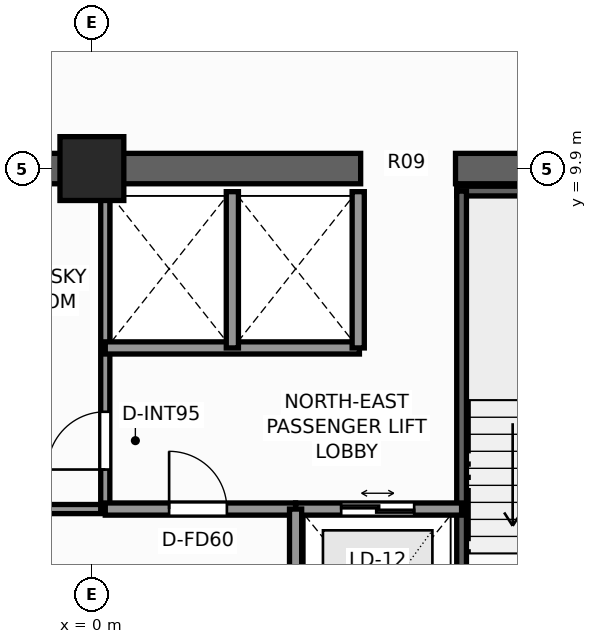
"""IFC4 building model, lengths in metres.
Left out: names, types, materials, properties, quantities, classifications, styles, units other than length and angle.
Written with IfcOpenShell. Run it as: python <this file> out.ifc"""

import sys

from ifc_helpers import new_model, si_unit, direction, frame, frame_2d, origin, origin_2d, place, context, subcontext, project, spatial, rectangle, extrude, element, fill, save


model = new_model("IFC4")
c1 = context("Model", 3, precision=1e-05, world=origin(), true_north=direction((0.0, 1.0)))
c2 = subcontext(c1, "Body", "Model", "MODEL_VIEW")
j1 = project(units=[si_unit("LENGTHUNIT", "METRE"), si_unit("PLANEANGLEUNIT", "RADIAN")], contexts=[c1])
p1 = place(None, origin())
s1 = spatial("IfcSite", under=j1, at=p1, CompositionType="ELEMENT")
p2 = place(p1, origin())
s2 = spatial("IfcBuilding", under=s1, at=p2, CompositionType="ELEMENT")
p3 = place(p2, frame((0.0, 0.0, 206.4)))
s3 = spatial("IfcBuildingStorey", under=s2, at=p3, CompositionType="ELEMENT", Elevation=206.4)
p4 = place(p3, frame((-10.15, 9.9, 0.0), z_axis=(0.0, 0.0, 1.0), x_axis=(1.0, 0.0, 0.0)))
e1 = element("IfcWall", 1, at=p4, inside=s3, PredefinedType="SHEAR", context=c2, shape_type="SweptSolid", body=[
    extrude(rectangle(XDim=14.57, YDim=0.5, at=frame_2d((7.285, 0.0))), origin(), (0.0, 0.0, 1.0), 3.3),
])
p5 = place(p3, frame((5.98, 9.9, 0.0), z_axis=(0.0, 0.0, 1.0), x_axis=(1.0, 0.0, 0.0)))
e2 = element("IfcWall", 2, at=p5, inside=s3, PredefinedType="SHEAR", context=c2, shape_type="SweptSolid", body=[
    extrude(rectangle(XDim=4.17, YDim=0.5, at=frame_2d((2.085, 0.0))), origin(), (0.0, 0.0, 1.0), 3.3),
])
p6 = place(p3, frame((0.0, 9.9, 0.0), z_axis=(0.0, 0.0, 1.0), x_axis=(1.0, 0.0, 0.0)))
e3 = element("IfcColumn", 3, at=p6, inside=s3, PredefinedType="COLUMN", context=c2, shape_type="SweptSolid", body=[
    extrude(rectangle(XDim=1.05, YDim=1.05, at=origin_2d()), origin(), (0.0, 0.0, 1.0), 3.3),
])
p7 = place(p3, frame((6.0, 9.53, 0.0), z_axis=(0.0, 0.0, 1.0), x_axis=(1.0, 0.0, 0.0)))
e4 = element("IfcWall", 4, at=p7, inside=s3, PredefinedType="SHEAR", context=c2, shape_type="SweptSolid", body=[
    extrude(rectangle(XDim=3.52, YDim=0.16, at=frame_2d((1.76, 0.0))), origin(), (0.0, 0.0, 1.0), 3.3),
])
p8 = place(p3, frame((6.08, 1.97, 0.0), z_axis=(0.0, 0.0, 1.0), x_axis=(0.0, 1.0, 0.0)))
e5 = element("IfcWall", 5, at=p8, inside=s3, PredefinedType="SHEAR", context=c2, shape_type="SweptSolid", body=[
    extrude(rectangle(XDim=7.56, YDim=0.16, at=frame_2d((3.78, 0.0))), origin(), (0.0, 0.0, 1.0), 3.3),
])
p9 = place(p3, frame((3.35, 4.3, 0.0), z_axis=(0.0, 0.0, 1.0), x_axis=(1.0, 0.0, 0.0)))
e6 = element("IfcWall", 6, at=p9, inside=s3, PredefinedType="SOLIDWALL", context=c2, shape_type="SweptSolid", body=[
    extrude(rectangle(XDim=2.73, YDim=0.2, at=frame_2d((1.365, 0.0))), origin(), (0.0, 0.0, 1.0), 3.08),
])
p10 = place(p9, frame((0.75, 0.0, 0.0)))
e7 = element("IfcOpeningElement", 7, at=p10, cuts=e6, PredefinedType="OPENING", context=c2, shape_type="SweptSolid", body=[
    extrude(rectangle(XDim=1.2, YDim=2.25, at=frame_2d((0.6, 1.125))), frame((0.0, 0.11, 0.0), z_axis=(0.0, -1.0, 0.0), x_axis=(1.0, 0.0, 0.0)), (0.0, 0.0, 1.0), 0.22),
])
p11 = place(p3, frame((-6.08, 4.3, 0.0), z_axis=(0.0, 0.0, 1.0), x_axis=(1.0, 0.0, 0.0)))
e8 = element("IfcWall", 8, at=p11, inside=s3, PredefinedType="PARTITIONING", context=c2, shape_type="SweptSolid", body=[
    extrude(rectangle(XDim=6.3, YDim=0.15, at=frame_2d((3.15, 0.0))), origin(), (0.0, 0.0, 1.0), 3.08),
])
p12 = place(p11, frame((1.05, 0.0, 0.0)))
e9 = element("IfcOpeningElement", 9, at=p12, cuts=e8, PredefinedType="OPENING", context=c2, shape_type="SweptSolid", body=[
    extrude(rectangle(XDim=0.85, YDim=2.03, at=frame_2d((0.425, 1.015))), frame((0.0, 0.085, 0.0), z_axis=(0.0, -1.0, 0.0), x_axis=(1.0, 0.0, 0.0)), (0.0, 0.0, 1.0), 0.17),
])
p13 = place(p3, frame((0.22, 4.3, 0.0), z_axis=(0.0, 0.0, 1.0), x_axis=(0.0, 1.0, 0.0)))
e10 = element("IfcWall", 10, at=p13, inside=s3, PredefinedType="PARTITIONING", context=c2, shape_type="SweptSolid", body=[
    extrude(rectangle(XDim=5.22, YDim=0.15, at=frame_2d((2.61, 0.0))), origin(), (0.0, 0.0, 1.0), 3.08),
])
p14 = place(p13, frame((0.65, 0.0, 0.0)))
e11 = element("IfcOpeningElement", 11, at=p14, cuts=e10, PredefinedType="OPENING", context=c2, shape_type="SweptSolid", body=[
    extrude(rectangle(XDim=0.95, YDim=2.06, at=frame_2d((0.475, 1.03))), frame((0.0, 0.085, 0.0), z_axis=(0.0, -1.0, 0.0), x_axis=(1.0, 0.0, 0.0)), (0.0, 0.0, 1.0), 0.17),
])
p15 = place(p3, frame((0.22, 6.95, 0.0), z_axis=(0.0, 0.0, 1.0), x_axis=(1.0, 0.0, 0.0)))
e12 = element("IfcWall", 12, at=p15, inside=s3, PredefinedType="SOLIDWALL", context=c2, shape_type="SweptSolid", body=[
    extrude(rectangle(XDim=4.18, YDim=0.2, at=frame_2d((2.09, 0.0))), origin(), (0.0, 0.0, 1.0), 3.08),
])
for number, where, z_axis, x_axis in (
    (13, (4.38, 6.95, 0.0), (0.0, 0.0, 1.0), (0.0, 1.0, 0.0)),
    (14, (2.31, 6.95, 0.0), (0.0, 0.0, 1.0), (0.0, 1.0, 0.0)),
):
    element("IfcWall", number, at=place(p3, frame(where, z_axis=z_axis, x_axis=x_axis)), inside=s3, PredefinedType="SOLIDWALL", context=c2, shape_type="SweptSolid", body=[
        extrude(rectangle(XDim=2.57, YDim=0.2, at=frame_2d((1.285, 0.0))), origin(), (0.0, 0.0, 1.0), 3.08),
    ])
p16 = place(p3, frame((0.22, 4.3, 0.0), z_axis=(0.0, 0.0, 1.0), x_axis=(1.0, 0.0, 0.0)))
e15 = element("IfcWall", 15, at=p16, inside=s3, PredefinedType="SOLIDWALL", context=c2, shape_type="SweptSolid", body=[
    extrude(rectangle(XDim=3.13, YDim=0.2, at=frame_2d((1.565, 0.0))), origin(), (0.0, 0.0, 1.0), 3.08),
])
p17 = place(p16, frame((1.05, 0.0, 0.0)))
e16 = element("IfcOpeningElement", 16, at=p17, cuts=e15, PredefinedType="OPENING", context=c2, shape_type="SweptSolid", body=[
    extrude(rectangle(XDim=0.95, YDim=2.06, at=frame_2d((0.475, 1.03))), frame((0.0, 0.11, 0.0), z_axis=(0.0, -1.0, 0.0), x_axis=(1.0, 0.0, 0.0)), (0.0, 0.0, 1.0), 0.22),
])
p18 = place(p3, frame((3.35, 1.1, 0.0), z_axis=(0.0, 0.0, 1.0), x_axis=(0.0, 1.0, 0.0)))
e17 = element("IfcWall", 17, at=p18, inside=s3, PredefinedType="SOLIDWALL", context=c2, shape_type="SweptSolid", body=[
    extrude(rectangle(XDim=3.2, YDim=0.2, at=frame_2d((1.6, 0.0))), origin(), (0.0, 0.0, 1.0), 3.08),
])
p19 = place(p10, origin())
e18 = element("IfcDoor", 18, at=p19, inside=s3, OperationType="DOUBLE_DOOR_SLIDING", PredefinedType="DOOR", context=c2, shape_type="SweptSolid", body=[
    extrude(rectangle(XDim=1.2, YDim=2.25, at=frame_2d((0.6, 1.125))), frame((0.0, 0.025, 0.0), z_axis=(0.0, -1.0, 0.0), x_axis=(1.0, 0.0, 0.0)), (0.0, 0.0, 1.0), 0.05),
])
fill(e7, e18)
p20 = place(p14, origin())
e19 = element("IfcDoor", 19, at=p20, inside=s3, OperationType="SINGLE_SWING_LEFT", PredefinedType="DOOR", context=c2, shape_type="SweptSolid", body=[
    extrude(rectangle(XDim=0.95, YDim=2.06, at=frame_2d((0.475, 1.03))), frame((0.0, 0.025, 0.0), z_axis=(0.0, -1.0, 0.0), x_axis=(1.0, 0.0, 0.0)), (0.0, 0.0, 1.0), 0.05),
])
fill(e11, e19)
p21 = place(p17, origin())
e20 = element("IfcDoor", 20, at=p21, inside=s3, OperationType="SINGLE_SWING_LEFT", PredefinedType="DOOR", context=c2, shape_type="SweptSolid", body=[
    extrude(rectangle(XDim=0.95, YDim=2.06, at=frame_2d((0.475, 1.03))), frame((0.0, 0.025, 0.0), z_axis=(0.0, -1.0, 0.0), x_axis=(1.0, 0.0, 0.0)), (0.0, 0.0, 1.0), 0.05),
])
fill(e16, e20)
save(model, sys.argv[1])
